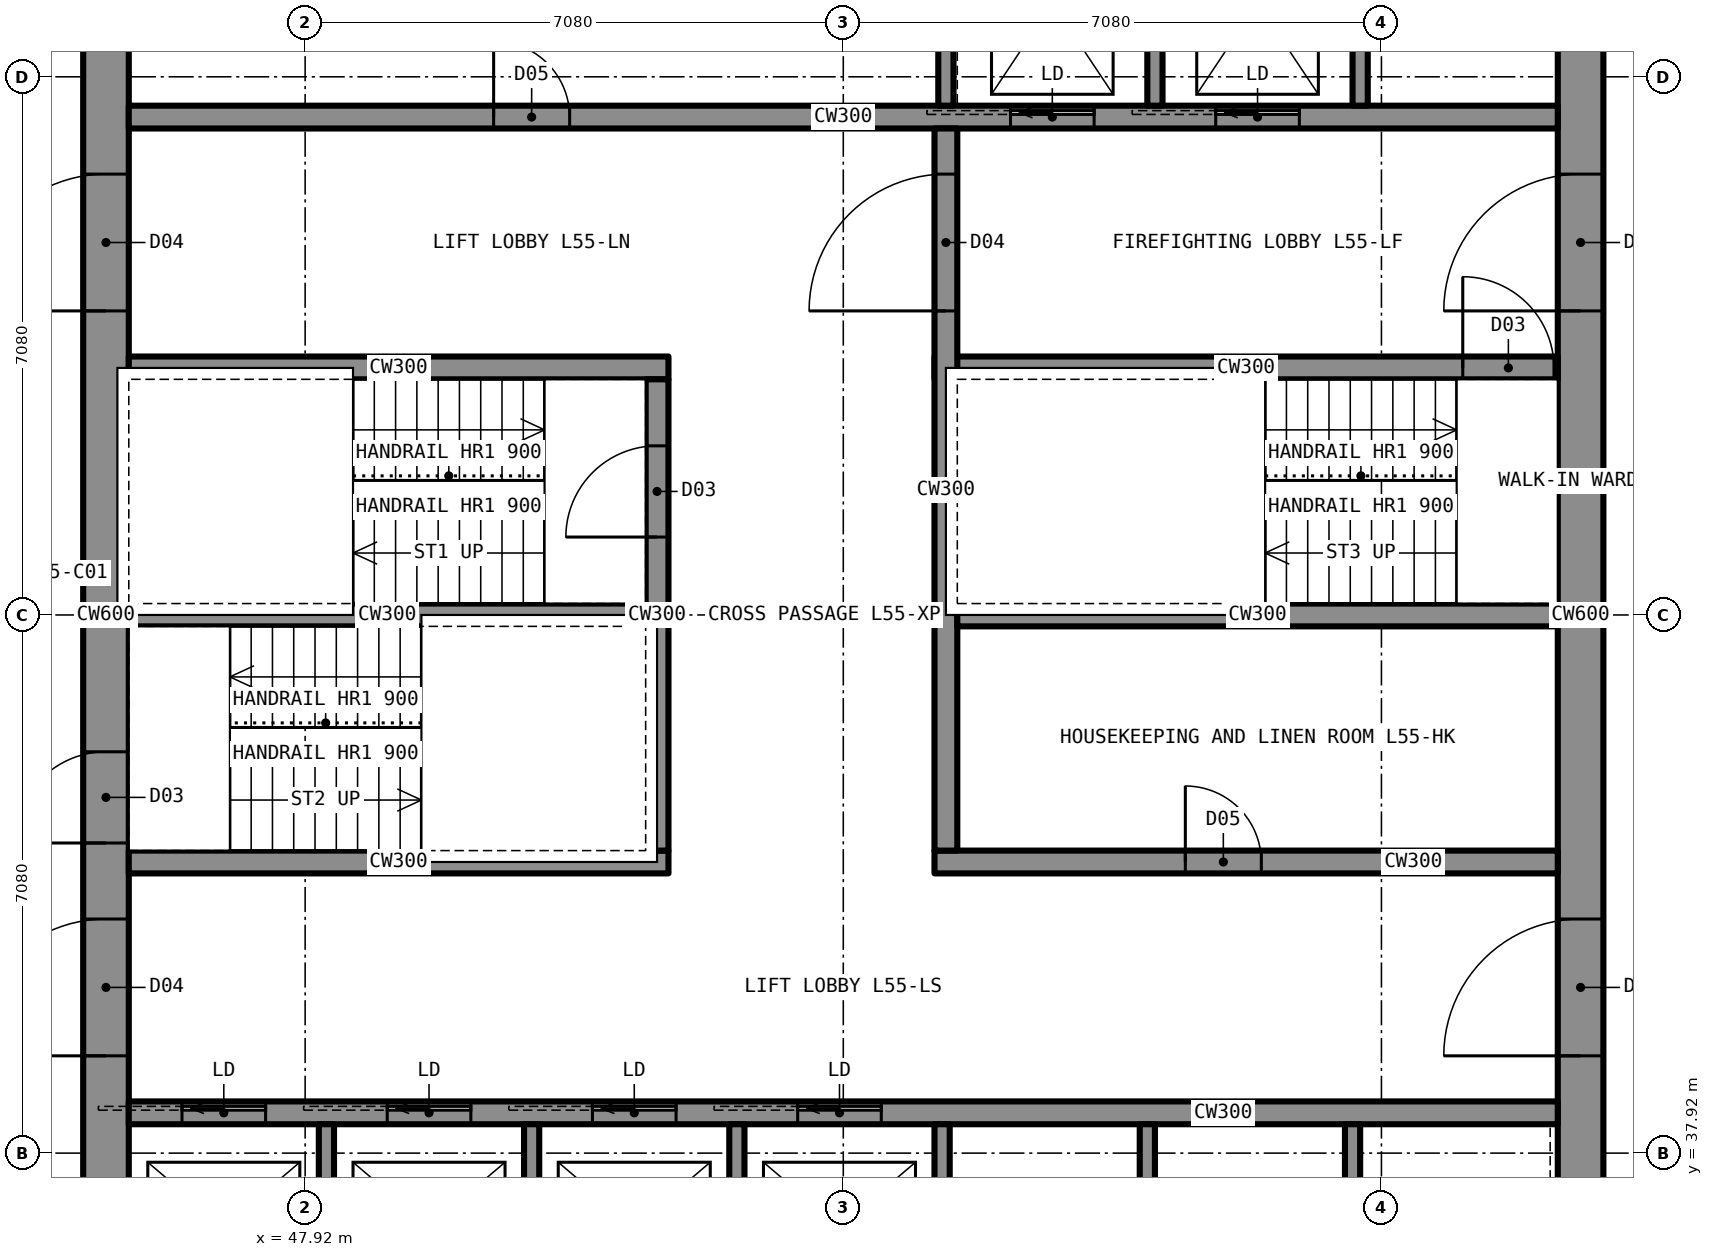
"""IFC4 building model, lengths in metres.
Left out: names, types, materials, properties, quantities, classifications, styles, units other than length and angle.
Written with IfcOpenShell. Run it as: python <this file> out.ifc"""

import sys

from ifc_helpers import new_model, si_unit, direction, frame, frame_2d, origin, place, context, subcontext, project, spatial, rectangle, extrude, element, fill, save


model = new_model("IFC4")
c1 = context("Model", 3, precision=1e-05, world=origin(), true_north=direction((0.0, 1.0)))
c2 = subcontext(c1, "Body", "Model", "MODEL_VIEW")
j1 = project(units=[si_unit("LENGTHUNIT", "METRE"), si_unit("PLANEANGLEUNIT", "RADIAN")], contexts=[c1])
p1 = place(None, origin())
s1 = spatial("IfcSite", under=j1, at=p1, CompositionType="ELEMENT")
p2 = place(p1, origin())
s2 = spatial("IfcBuilding", under=s1, at=p2, CompositionType="ELEMENT")
p3 = place(p2, frame((0.0, 0.0, 203.8)))
s3 = spatial("IfcBuildingStorey", under=s2, at=p3, CompositionType="ELEMENT", Elevation=203.8)
p4 = place(p3, frame((64.7, 35.6, 0.0), z_axis=(0.0, 0.0, 1.0), x_axis=(0.0, 1.0, 0.0)))
e1 = element("IfcWall", 1, at=p4, inside=s3, PredefinedType="SHEAR", context=c2, shape_type="SweptSolid", body=[
    extrude(rectangle(XDim=18.8, YDim=0.6, at=frame_2d((9.4, 0.0))), origin(), (0.0, 0.0, 1.0), 3.5),
])
p5 = place(p4, frame((13.4, 0.0, 0.0)))
e2 = element("IfcOpeningElement", 2, at=p5, cuts=e1, PredefinedType="OPENING", context=c2, shape_type="SweptSolid", body=[
    extrude(rectangle(XDim=1.8, YDim=2.2, at=frame_2d((0.9, 1.1))), frame((0.0, 0.31, 0.0), z_axis=(0.0, -1.0, 0.0), x_axis=(1.0, 0.0, 0.0)), (0.0, 0.0, 1.0), 0.62),
])
p6 = place(p4, frame((3.6, 0.0, 0.0)))
e3 = element("IfcOpeningElement", 3, at=p6, cuts=e1, PredefinedType="OPENING", context=c2, shape_type="SweptSolid", body=[
    extrude(rectangle(XDim=1.8, YDim=2.2, at=frame_2d((0.9, 1.1))), frame((0.0, 0.31, 0.0), z_axis=(0.0, -1.0, 0.0), x_axis=(1.0, 0.0, 0.0)), (0.0, 0.0, 1.0), 0.62),
])
p7 = place(p3, frame((45.3, 35.6, 0.0), z_axis=(0.0, 0.0, 1.0), x_axis=(0.0, 1.0, 0.0)))
e4 = element("IfcWall", 4, at=p7, inside=s3, PredefinedType="SHEAR", context=c2, shape_type="SweptSolid", body=[
    extrude(rectangle(XDim=18.8, YDim=0.6, at=frame_2d((9.4, 0.0))), origin(), (0.0, 0.0, 1.0), 3.5),
])
p8 = place(p7, frame((13.4, 0.0, 0.0)))
e5 = element("IfcOpeningElement", 5, at=p8, cuts=e4, PredefinedType="OPENING", context=c2, shape_type="SweptSolid", body=[
    extrude(rectangle(XDim=1.8, YDim=2.2, at=frame_2d((0.9, 1.1))), frame((0.0, 0.31, 0.0), z_axis=(0.0, -1.0, 0.0), x_axis=(1.0, 0.0, 0.0)), (0.0, 0.0, 1.0), 0.62),
])
p9 = place(p7, frame((3.6, 0.0, 0.0)))
e6 = element("IfcOpeningElement", 6, at=p9, cuts=e4, PredefinedType="OPENING", context=c2, shape_type="SweptSolid", body=[
    extrude(rectangle(XDim=1.8, YDim=2.2, at=frame_2d((0.9, 1.1))), frame((0.0, 0.31, 0.0), z_axis=(0.0, -1.0, 0.0), x_axis=(1.0, 0.0, 0.0)), (0.0, 0.0, 1.0), 0.62),
])
p10 = place(p7, frame((6.4, 0.0, 0.0)))
e7 = element("IfcOpeningElement", 7, at=p10, cuts=e4, PredefinedType="OPENING", context=c2, shape_type="SweptSolid", body=[
    extrude(rectangle(XDim=1.2, YDim=2.2, at=frame_2d((0.6, 1.1))), frame((0.0, 0.31, 0.0), z_axis=(0.0, -1.0, 0.0), x_axis=(1.0, 0.0, 0.0)), (0.0, 0.0, 1.0), 0.62),
])
p11 = place(p3, frame((45.6, 51.55, 0.0), z_axis=(0.0, 0.0, 1.0), x_axis=(1.0, 0.0, 0.0)))
e8 = element("IfcWall", 8, at=p11, inside=s3, PredefinedType="SHEAR", context=c2, shape_type="SweptSolid", body=[
    extrude(rectangle(XDim=18.8, YDim=0.3, at=frame_2d((9.4, 0.0))), origin(), (0.0, 0.0, 1.0), 3.5),
])
p12 = place(p11, frame((4.8, 0.0, 0.0)))
e9 = element("IfcOpeningElement", 9, at=p12, cuts=e8, PredefinedType="OPENING", context=c2, shape_type="SweptSolid", body=[
    extrude(rectangle(XDim=1.0, YDim=2.1, at=frame_2d((0.5, 1.05))), frame((0.0, 0.16, 0.0), z_axis=(0.0, -1.0, 0.0), x_axis=(1.0, 0.0, 0.0)), (0.0, 0.0, 1.0), 0.32),
])
p13 = place(p11, frame((11.6, 0.0, 0.0)))
e10 = element("IfcOpeningElement", 10, at=p13, cuts=e8, PredefinedType="OPENING", context=c2, shape_type="SweptSolid", body=[
    extrude(rectangle(XDim=1.1, YDim=2.2, at=frame_2d((0.55, 1.1))), frame((0.0, 0.16, 0.0), z_axis=(0.0, -1.0, 0.0), x_axis=(1.0, 0.0, 0.0)), (0.0, 0.0, 1.0), 0.32),
])
p14 = place(p11, frame((14.3, 0.0, 0.0)))
e11 = element("IfcOpeningElement", 11, at=p14, cuts=e8, PredefinedType="OPENING", context=c2, shape_type="SweptSolid", body=[
    extrude(rectangle(XDim=1.1, YDim=2.2, at=frame_2d((0.55, 1.1))), frame((0.0, 0.16, 0.0), z_axis=(0.0, -1.0, 0.0), x_axis=(1.0, 0.0, 0.0)), (0.0, 0.0, 1.0), 0.32),
])
p15 = place(p3, frame((45.6, 38.45, 0.0), z_axis=(0.0, 0.0, 1.0), x_axis=(1.0, 0.0, 0.0)))
e12 = element("IfcWall", 12, at=p15, inside=s3, PredefinedType="SHEAR", context=c2, shape_type="SweptSolid", body=[
    extrude(rectangle(XDim=18.8, YDim=0.3, at=frame_2d((9.4, 0.0))), origin(), (0.0, 0.0, 1.0), 3.5),
])
p16 = place(p15, frame((0.7, 0.0, 0.0)))
e13 = element("IfcOpeningElement", 13, at=p16, cuts=e12, PredefinedType="OPENING", context=c2, shape_type="SweptSolid", body=[
    extrude(rectangle(XDim=1.1, YDim=2.2, at=frame_2d((0.55, 1.1))), frame((0.0, 0.16, 0.0), z_axis=(0.0, -1.0, 0.0), x_axis=(1.0, 0.0, 0.0)), (0.0, 0.0, 1.0), 0.32),
])
p17 = place(p15, frame((3.4, 0.0, 0.0)))
e14 = element("IfcOpeningElement", 14, at=p17, cuts=e12, PredefinedType="OPENING", context=c2, shape_type="SweptSolid", body=[
    extrude(rectangle(XDim=1.1, YDim=2.2, at=frame_2d((0.55, 1.1))), frame((0.0, 0.16, 0.0), z_axis=(0.0, -1.0, 0.0), x_axis=(1.0, 0.0, 0.0)), (0.0, 0.0, 1.0), 0.32),
])
p18 = place(p15, frame((6.1, 0.0, 0.0)))
e15 = element("IfcOpeningElement", 15, at=p18, cuts=e12, PredefinedType="OPENING", context=c2, shape_type="SweptSolid", body=[
    extrude(rectangle(XDim=1.1, YDim=2.2, at=frame_2d((0.55, 1.1))), frame((0.0, 0.16, 0.0), z_axis=(0.0, -1.0, 0.0), x_axis=(1.0, 0.0, 0.0)), (0.0, 0.0, 1.0), 0.32),
])
p19 = place(p15, frame((8.8, 0.0, 0.0)))
e16 = element("IfcOpeningElement", 16, at=p19, cuts=e12, PredefinedType="OPENING", context=c2, shape_type="SweptSolid", body=[
    extrude(rectangle(XDim=1.1, YDim=2.2, at=frame_2d((0.55, 1.1))), frame((0.0, 0.16, 0.0), z_axis=(0.0, -1.0, 0.0), x_axis=(1.0, 0.0, 0.0)), (0.0, 0.0, 1.0), 0.32),
])
p20 = place(p3, frame((45.6, 48.25, 0.0), z_axis=(0.0, 0.0, 1.0), x_axis=(1.0, 0.0, 0.0)))
e17 = element("IfcWall", 17, at=p20, inside=s3, PredefinedType="SHEAR", context=c2, shape_type="SweptSolid", body=[
    extrude(rectangle(XDim=7.1, YDim=0.3, at=frame_2d((3.55, 0.0))), origin(), (0.0, 0.0, 1.0), 3.5),
])
p21 = place(p3, frame((56.2, 48.25, 0.0), z_axis=(0.0, 0.0, 1.0), x_axis=(1.0, 0.0, 0.0)))
e18 = element("IfcWall", 18, at=p21, inside=s3, PredefinedType="SHEAR", context=c2, shape_type="SweptSolid", body=[
    extrude(rectangle(XDim=8.2, YDim=0.3, at=frame_2d((4.1, 0.0))), origin(), (0.0, 0.0, 1.0), 3.5),
])
p22 = place(p21, frame((6.95, 0.0, 0.0)))
e19 = element("IfcOpeningElement", 19, at=p22, cuts=e18, PredefinedType="OPENING", context=c2, shape_type="SweptSolid", body=[
    extrude(rectangle(XDim=1.2, YDim=2.2, at=frame_2d((0.6, 1.1))), frame((0.0, 0.16, 0.0), z_axis=(0.0, -1.0, 0.0), x_axis=(1.0, 0.0, 0.0)), (0.0, 0.0, 1.0), 0.32),
])
p23 = place(p3, frame((45.6, 41.75, 0.0), z_axis=(0.0, 0.0, 1.0), x_axis=(1.0, 0.0, 0.0)))
e20 = element("IfcWall", 20, at=p23, inside=s3, PredefinedType="SHEAR", context=c2, shape_type="SweptSolid", body=[
    extrude(rectangle(XDim=7.1, YDim=0.3, at=frame_2d((3.55, 0.0))), origin(), (0.0, 0.0, 1.0), 3.5),
])
p24 = place(p3, frame((56.2, 41.75, 0.0), z_axis=(0.0, 0.0, 1.0), x_axis=(1.0, 0.0, 0.0)))
e21 = element("IfcWall", 21, at=p24, inside=s3, PredefinedType="SHEAR", context=c2, shape_type="SweptSolid", body=[
    extrude(rectangle(XDim=8.2, YDim=0.3, at=frame_2d((4.1, 0.0))), origin(), (0.0, 0.0, 1.0), 3.5),
])
p25 = place(p24, frame((3.3, 0.0, 0.0)))
e22 = element("IfcOpeningElement", 22, at=p25, cuts=e21, PredefinedType="OPENING", context=c2, shape_type="SweptSolid", body=[
    extrude(rectangle(XDim=1.0, YDim=2.1, at=frame_2d((0.5, 1.05))), frame((0.0, 0.16, 0.0), z_axis=(0.0, -1.0, 0.0), x_axis=(1.0, 0.0, 0.0)), (0.0, 0.0, 1.0), 0.32),
])
p26 = place(p3, frame((52.55, 41.9, 0.0), z_axis=(0.0, 0.0, 1.0), x_axis=(0.0, 1.0, 0.0)))
e23 = element("IfcWall", 23, at=p26, inside=s3, PredefinedType="SHEAR", context=c2, shape_type="SweptSolid", body=[
    extrude(rectangle(XDim=6.2, YDim=0.3, at=frame_2d((3.1, 0.0))), origin(), (0.0, 0.0, 1.0), 3.5),
])
p27 = place(p26, frame((4.125, 0.0, 0.0)))
e24 = element("IfcOpeningElement", 24, at=p27, cuts=e23, PredefinedType="OPENING", context=c2, shape_type="SweptSolid", body=[
    extrude(rectangle(XDim=1.2, YDim=2.2, at=frame_2d((0.6, 1.1))), frame((0.0, 0.16, 0.0), z_axis=(0.0, -1.0, 0.0), x_axis=(1.0, 0.0, 0.0)), (0.0, 0.0, 1.0), 0.32),
])
p28 = place(p3, frame((56.35, 41.9, 0.0), z_axis=(0.0, 0.0, 1.0), x_axis=(0.0, 1.0, 0.0)))
e25 = element("IfcWall", 25, at=p28, inside=s3, PredefinedType="SHEAR", context=c2, shape_type="SweptSolid", body=[
    extrude(rectangle(XDim=9.5, YDim=0.3, at=frame_2d((4.75, 0.0))), origin(), (0.0, 0.0, 1.0), 3.5),
])
p29 = place(p28, frame((7.1, 0.0, 0.0)))
e26 = element("IfcOpeningElement", 26, at=p29, cuts=e25, PredefinedType="OPENING", context=c2, shape_type="SweptSolid", body=[
    extrude(rectangle(XDim=1.8, YDim=2.2, at=frame_2d((0.9, 1.1))), frame((0.0, 0.16, 0.0), z_axis=(0.0, -1.0, 0.0), x_axis=(1.0, 0.0, 0.0)), (0.0, 0.0, 1.0), 0.32),
])
p30 = place(p3, frame((45.6, 45.0, 0.0), z_axis=(0.0, 0.0, 1.0), x_axis=(1.0, 0.0, 0.0)))
e27 = element("IfcWall", 27, at=p30, inside=s3, PredefinedType="SHEAR", context=c2, shape_type="SweptSolid", body=[
    extrude(rectangle(XDim=6.8, YDim=0.3, at=frame_2d((3.4, 0.0))), origin(), (0.0, 0.0, 1.0), 3.5),
])
p31 = place(p3, frame((56.5, 45.0, 0.0), z_axis=(0.0, 0.0, 1.0), x_axis=(1.0, 0.0, 0.0)))
e28 = element("IfcWall", 28, at=p31, inside=s3, PredefinedType="SHEAR", context=c2, shape_type="SweptSolid", body=[
    extrude(rectangle(XDim=7.9, YDim=0.3, at=frame_2d((3.95, 0.0))), origin(), (0.0, 0.0, 1.0), 3.5),
])
for number, where, z_axis, x_axis in (
    (29, (59.1, 51.7, 0.0), (0.0, 0.0, 1.0), (0.0, 1.0, 0.0)),
    (30, (61.8, 51.7, 0.0), (0.0, 0.0, 1.0), (0.0, 1.0, 0.0)),
    (31, (56.35, 51.7, 0.0), (0.0, 0.0, 1.0), (0.0, 1.0, 0.0)),
    (32, (48.2, 35.6, 0.0), (0.0, 0.0, 1.0), (0.0, 1.0, 0.0)),
    (33, (50.9, 35.6, 0.0), (0.0, 0.0, 1.0), (0.0, 1.0, 0.0)),
    (34, (53.6, 35.6, 0.0), (0.0, 0.0, 1.0), (0.0, 1.0, 0.0)),
    (35, (56.3, 35.6, 0.0), (0.0, 0.0, 1.0), (0.0, 1.0, 0.0)),
    (36, (59.0, 35.6, 0.0), (0.0, 0.0, 1.0), (0.0, 1.0, 0.0)),
    (37, (61.7, 35.6, 0.0), (0.0, 0.0, 1.0), (0.0, 1.0, 0.0)),
):
    element("IfcWall", number, at=place(p3, frame(where, z_axis=z_axis, x_axis=x_axis)), inside=s3, PredefinedType="PARTITIONING", context=c2, shape_type="SweptSolid", body=[
        extrude(rectangle(XDim=2.7, YDim=0.2, at=frame_2d((1.35, 0.0))), origin(), (0.0, 0.0, 1.0), 3.33),
    ])
p32 = place(p8, origin())
e38 = element("IfcDoor", 38, at=p32, inside=s3, OperationType="DOUBLE_DOOR_SINGLE_SWING", PredefinedType="DOOR", context=c2, shape_type="SweptSolid", body=[
    extrude(rectangle(XDim=1.8, YDim=2.2, at=frame_2d((0.9, 1.1))), frame((0.0, 0.025, 0.0), z_axis=(0.0, -1.0, 0.0), x_axis=(1.0, 0.0, 0.0)), (0.0, 0.0, 1.0), 0.05),
])
fill(e5, e38)
p33 = place(p9, origin())
e39 = element("IfcDoor", 39, at=p33, inside=s3, OperationType="DOUBLE_DOOR_SINGLE_SWING", PredefinedType="DOOR", context=c2, shape_type="SweptSolid", body=[
    extrude(rectangle(XDim=1.8, YDim=2.2, at=frame_2d((0.9, 1.1))), frame((0.0, 0.025, 0.0), z_axis=(0.0, -1.0, 0.0), x_axis=(1.0, 0.0, 0.0)), (0.0, 0.0, 1.0), 0.05),
])
fill(e6, e39)
p34 = place(p5, origin())
e40 = element("IfcDoor", 40, at=p34, inside=s3, OperationType="DOUBLE_DOOR_SINGLE_SWING", PredefinedType="DOOR", context=c2, shape_type="SweptSolid", body=[
    extrude(rectangle(XDim=1.8, YDim=2.2, at=frame_2d((0.9, 1.1))), frame((0.0, 0.025, 0.0), z_axis=(0.0, -1.0, 0.0), x_axis=(1.0, 0.0, 0.0)), (0.0, 0.0, 1.0), 0.05),
])
fill(e2, e40)
p35 = place(p6, origin())
e41 = element("IfcDoor", 41, at=p35, inside=s3, OperationType="DOUBLE_DOOR_SINGLE_SWING", PredefinedType="DOOR", context=c2, shape_type="SweptSolid", body=[
    extrude(rectangle(XDim=1.8, YDim=2.2, at=frame_2d((0.9, 1.1))), frame((0.0, 0.025, 0.0), z_axis=(0.0, -1.0, 0.0), x_axis=(1.0, 0.0, 0.0)), (0.0, 0.0, 1.0), 0.05),
])
fill(e3, e41)
p36 = place(p29, origin())
e42 = element("IfcDoor", 42, at=p36, inside=s3, OperationType="DOUBLE_DOOR_SINGLE_SWING", PredefinedType="DOOR", context=c2, shape_type="SweptSolid", body=[
    extrude(rectangle(XDim=1.8, YDim=2.2, at=frame_2d((0.9, 1.1))), frame((0.0, 0.025, 0.0), z_axis=(0.0, -1.0, 0.0), x_axis=(1.0, 0.0, 0.0)), (0.0, 0.0, 1.0), 0.05),
])
fill(e26, e42)
p37 = place(p27, origin())
e43 = element("IfcDoor", 43, at=p37, inside=s3, OperationType="SINGLE_SWING_LEFT", PredefinedType="DOOR", context=c2, shape_type="SweptSolid", body=[
    extrude(rectangle(XDim=1.2, YDim=2.2, at=frame_2d((0.6, 1.1))), frame((0.0, 0.025, 0.0), z_axis=(0.0, -1.0, 0.0), x_axis=(1.0, 0.0, 0.0)), (0.0, 0.0, 1.0), 0.05),
])
fill(e24, e43)
p38 = place(p10, origin())
e44 = element("IfcDoor", 44, at=p38, inside=s3, OperationType="SINGLE_SWING_LEFT", PredefinedType="DOOR", context=c2, shape_type="SweptSolid", body=[
    extrude(rectangle(XDim=1.2, YDim=2.2, at=frame_2d((0.6, 1.1))), frame((0.0, 0.025, 0.0), z_axis=(0.0, -1.0, 0.0), x_axis=(1.0, 0.0, 0.0)), (0.0, 0.0, 1.0), 0.05),
])
fill(e7, e44)
p39 = place(p22, origin())
e45 = element("IfcDoor", 45, at=p39, inside=s3, OperationType="SINGLE_SWING_LEFT", PredefinedType="DOOR", context=c2, shape_type="SweptSolid", body=[
    extrude(rectangle(XDim=1.2, YDim=2.2, at=frame_2d((0.6, 1.1))), frame((0.0, 0.025, 0.0), z_axis=(0.0, -1.0, 0.0), x_axis=(1.0, 0.0, 0.0)), (0.0, 0.0, 1.0), 0.05),
])
fill(e19, e45)
p40 = place(p25, origin())
e46 = element("IfcDoor", 46, at=p40, inside=s3, OperationType="SINGLE_SWING_LEFT", PredefinedType="DOOR", context=c2, shape_type="SweptSolid", body=[
    extrude(rectangle(XDim=1.0, YDim=2.1, at=frame_2d((0.5, 1.05))), frame((0.0, 0.025, 0.0), z_axis=(0.0, -1.0, 0.0), x_axis=(1.0, 0.0, 0.0)), (0.0, 0.0, 1.0), 0.05),
])
fill(e22, e46)
p41 = place(p12, origin())
e47 = element("IfcDoor", 47, at=p41, inside=s3, OperationType="SINGLE_SWING_LEFT", PredefinedType="DOOR", context=c2, shape_type="SweptSolid", body=[
    extrude(rectangle(XDim=1.0, YDim=2.1, at=frame_2d((0.5, 1.05))), frame((0.0, 0.025, 0.0), z_axis=(0.0, -1.0, 0.0), x_axis=(1.0, 0.0, 0.0)), (0.0, 0.0, 1.0), 0.05),
])
fill(e9, e47)
p42 = place(p13, origin())
e48 = element("IfcDoor", 48, at=p42, inside=s3, OperationType="SLIDING_TO_LEFT", PredefinedType="DOOR", context=c2, shape_type="SweptSolid", body=[
    extrude(rectangle(XDim=1.1, YDim=2.2, at=frame_2d((0.55, 1.1))), frame((0.0, 0.025, 0.0), z_axis=(0.0, -1.0, 0.0), x_axis=(1.0, 0.0, 0.0)), (0.0, 0.0, 1.0), 0.05),
])
fill(e10, e48)
p43 = place(p14, origin())
e49 = element("IfcDoor", 49, at=p43, inside=s3, OperationType="SLIDING_TO_LEFT", PredefinedType="DOOR", context=c2, shape_type="SweptSolid", body=[
    extrude(rectangle(XDim=1.1, YDim=2.2, at=frame_2d((0.55, 1.1))), frame((0.0, 0.025, 0.0), z_axis=(0.0, -1.0, 0.0), x_axis=(1.0, 0.0, 0.0)), (0.0, 0.0, 1.0), 0.05),
])
fill(e11, e49)
p44 = place(p16, origin())
e50 = element("IfcDoor", 50, at=p44, inside=s3, OperationType="SLIDING_TO_LEFT", PredefinedType="DOOR", context=c2, shape_type="SweptSolid", body=[
    extrude(rectangle(XDim=1.1, YDim=2.2, at=frame_2d((0.55, 1.1))), frame((0.0, 0.025, 0.0), z_axis=(0.0, -1.0, 0.0), x_axis=(1.0, 0.0, 0.0)), (0.0, 0.0, 1.0), 0.05),
])
fill(e13, e50)
p45 = place(p17, origin())
e51 = element("IfcDoor", 51, at=p45, inside=s3, OperationType="SLIDING_TO_LEFT", PredefinedType="DOOR", context=c2, shape_type="SweptSolid", body=[
    extrude(rectangle(XDim=1.1, YDim=2.2, at=frame_2d((0.55, 1.1))), frame((0.0, 0.025, 0.0), z_axis=(0.0, -1.0, 0.0), x_axis=(1.0, 0.0, 0.0)), (0.0, 0.0, 1.0), 0.05),
])
fill(e14, e51)
p46 = place(p18, origin())
e52 = element("IfcDoor", 52, at=p46, inside=s3, OperationType="SLIDING_TO_LEFT", PredefinedType="DOOR", context=c2, shape_type="SweptSolid", body=[
    extrude(rectangle(XDim=1.1, YDim=2.2, at=frame_2d((0.55, 1.1))), frame((0.0, 0.025, 0.0), z_axis=(0.0, -1.0, 0.0), x_axis=(1.0, 0.0, 0.0)), (0.0, 0.0, 1.0), 0.05),
])
fill(e15, e52)
p47 = place(p19, origin())
e53 = element("IfcDoor", 53, at=p47, inside=s3, OperationType="SLIDING_TO_LEFT", PredefinedType="DOOR", context=c2, shape_type="SweptSolid", body=[
    extrude(rectangle(XDim=1.1, YDim=2.2, at=frame_2d((0.55, 1.1))), frame((0.0, 0.025, 0.0), z_axis=(0.0, -1.0, 0.0), x_axis=(1.0, 0.0, 0.0)), (0.0, 0.0, 1.0), 0.05),
])
fill(e16, e53)
save(model, sys.argv[1])
